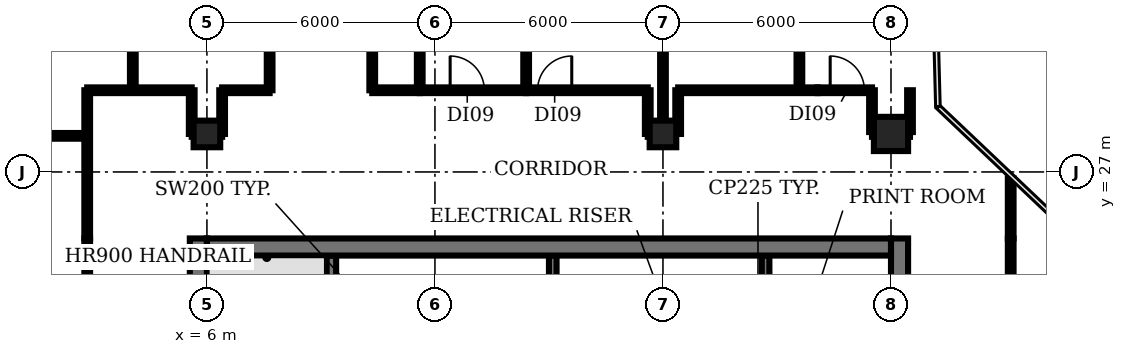
"""IFC4 building model, lengths in metres.
Left out: names, types, materials, properties, quantities, classifications, styles, units other than length and angle.
Written with IfcOpenShell. Run it as: python <this file> out.ifc"""

import sys

from ifc_helpers import new_model, si_unit, direction, frame, frame_2d, origin, origin_2d, place, context, subcontext, project, spatial, rectangle, circle, extrude, element, fill, save


model = new_model("IFC4")
c1 = context("Model", 3, precision=1e-05, world=origin(), true_north=direction((0.0, 1.0)))
c2 = subcontext(c1, "Body", "Model", "MODEL_VIEW")
j1 = project(units=[si_unit("LENGTHUNIT", "METRE"), si_unit("PLANEANGLEUNIT", "RADIAN")], contexts=[c1])
p1 = place(None, origin())
s1 = spatial("IfcSite", under=j1, at=p1, CompositionType="ELEMENT")
p2 = place(p1, origin())
s2 = spatial("IfcBuilding", under=s1, at=p2, CompositionType="ELEMENT")
p3 = place(p2, frame((0.0, 0.0, 222.2)))
s3 = spatial("IfcBuildingStorey", under=s2, at=p3, CompositionType="ELEMENT", Elevation=222.2)
for number, where, z_axis, x_axis in (
    (1, (6.0, 28.0, 0.0), (0.0, 0.0, 1.0), (1.0, 0.0, 0.0)),
    (2, (18.0, 28.0, 0.0), (0.0, 0.0, 1.0), (1.0, 0.0, 0.0)),
):
    element("IfcColumn", number, at=place(p3, frame(where, z_axis=z_axis, x_axis=x_axis)), inside=s3, PredefinedType="COLUMN", context=c2, shape_type="SweptSolid", body=[
        extrude(rectangle(XDim=0.7, YDim=0.7, at=origin_2d()), origin(), (0.0, 0.0, 1.0), 3.85),
    ])
p4 = place(p3, frame((24.0, 28.0, 0.0), z_axis=(0.0, 0.0, 1.0), x_axis=(1.0, 0.0, 0.0)))
e3 = element("IfcColumn", 3, at=p4, inside=s3, PredefinedType="COLUMN", context=c2, shape_type="SweptSolid", body=[
    extrude(circle(Radius=0.45, at=origin_2d()), origin(), (0.0, 0.0, 1.0), 3.85),
])
p5 = place(p3, frame((9.275, 18.375, 0.0), z_axis=(0.0, 0.0, 1.0), x_axis=(0.0, 1.0, 0.0)))
e4 = element("IfcWall", 4, at=p5, inside=s3, PredefinedType="SHEAR", context=c2, shape_type="SweptSolid", body=[
    extrude(rectangle(XDim=6.425, YDim=0.25, at=frame_2d((3.212, 0.0))), origin(), (0.0, 0.0, 1.0), 3.85),
])
for number, where, z_axis, x_axis in (
    (5, (15.1, 22.9, 0.0), (0.0, 0.0, 1.0), (0.0, 1.0, 0.0)),
    (6, (20.7, 22.9, 0.0), (0.0, 0.0, 1.0), (0.0, 1.0, 0.0)),
):
    element("IfcWall", number, at=place(p3, frame(where, z_axis=z_axis, x_axis=x_axis)), inside=s3, PredefinedType="SHEAR", context=c2, shape_type="SweptSolid", body=[
        extrude(rectangle(XDim=1.9, YDim=0.2, at=frame_2d((0.95, 0.0))), origin(), (0.0, 0.0, 1.0), 3.85),
    ])
p6 = place(p3, frame((5.775, 4.42, 0.0), z_axis=(0.0, 0.0, 1.0), x_axis=(0.0, 1.0, 0.0)))
e7 = element("IfcWall", 7, at=p6, inside=s3, PredefinedType="SHEAR", context=c2, shape_type="SweptSolid", body=[
    extrude(rectangle(XDim=20.83, YDim=0.45, at=frame_2d((10.415, 0.0))), origin(), (0.0, 0.0, 1.0), 3.85),
])
p7 = place(p6, frame((1.23, 0.0, 0.0)))
e8 = element("IfcOpeningElement", 8, at=p7, cuts=e7, PredefinedType="OPENING", context=c2, shape_type="SweptSolid", body=[
    extrude(rectangle(XDim=1.5, YDim=2.1, at=frame_2d((0.75, 1.05))), frame((0.0, 0.235, 0.0), z_axis=(0.0, -1.0, 0.0), x_axis=(1.0, 0.0, 0.0)), (0.0, 0.0, 1.0), 0.47),
])
p8 = place(p6, frame((7.68, 0.0, 0.0)))
e9 = element("IfcOpeningElement", 9, at=p8, cuts=e7, PredefinedType="OPENING", context=c2, shape_type="SweptSolid", body=[
    extrude(rectangle(XDim=1.2, YDim=2.1, at=frame_2d((0.6, 1.05))), frame((0.0, 0.235, 0.0), z_axis=(0.0, -1.0, 0.0), x_axis=(1.0, 0.0, 0.0)), (0.0, 0.0, 1.0), 0.47),
])
p9 = place(p6, frame((14.23, 0.0, 0.0)))
e10 = element("IfcOpeningElement", 10, at=p9, cuts=e7, PredefinedType="OPENING", context=c2, shape_type="SweptSolid", body=[
    extrude(rectangle(XDim=1.2, YDim=2.1, at=frame_2d((0.6, 1.05))), frame((0.0, 0.235, 0.0), z_axis=(0.0, -1.0, 0.0), x_axis=(1.0, 0.0, 0.0)), (0.0, 0.0, 1.0), 0.47),
])
p10 = place(p3, frame((24.225, 25.25, 0.0), z_axis=(0.0, 0.0, 1.0), x_axis=(0.0, -1.0, 0.0)))
e11 = element("IfcWall", 11, at=p10, inside=s3, PredefinedType="SHEAR", context=c2, shape_type="SweptSolid", body=[
    extrude(rectangle(XDim=20.83, YDim=0.45, at=frame_2d((10.415, 0.0))), origin(), (0.0, 0.0, 1.0), 3.85),
])
p11 = place(p10, frame((18.1, 0.0, 0.0)))
e12 = element("IfcOpeningElement", 12, at=p11, cuts=e11, PredefinedType="OPENING", context=c2, shape_type="SweptSolid", body=[
    extrude(rectangle(XDim=1.5, YDim=2.1, at=frame_2d((0.75, 1.05))), frame((0.0, 0.235, 0.0), z_axis=(0.0, -1.0, 0.0), x_axis=(1.0, 0.0, 0.0)), (0.0, 0.0, 1.0), 0.47),
])
p12 = place(p10, frame((12.0, 0.0, 0.0)))
e13 = element("IfcOpeningElement", 13, at=p12, cuts=e11, PredefinedType="OPENING", context=c2, shape_type="SweptSolid", body=[
    extrude(rectangle(XDim=0.9, YDim=2.1, at=frame_2d((0.45, 1.05))), frame((0.0, 0.235, 0.0), z_axis=(0.0, -1.0, 0.0), x_axis=(1.0, 0.0, 0.0)), (0.0, 0.0, 1.0), 0.47),
])
p13 = place(p10, frame((6.0, 0.0, 0.0)))
e14 = element("IfcOpeningElement", 14, at=p13, cuts=e11, PredefinedType="OPENING", context=c2, shape_type="SweptSolid", body=[
    extrude(rectangle(XDim=2.0, YDim=2.1, at=frame_2d((1.0, 1.05))), frame((0.0, 0.235, 0.0), z_axis=(0.0, -1.0, 0.0), x_axis=(1.0, 0.0, 0.0)), (0.0, 0.0, 1.0), 0.47),
])
p14 = place(p3, frame((6.0, 25.025, 0.0), z_axis=(0.0, 0.0, 1.0), x_axis=(1.0, 0.0, 0.0)))
e15 = element("IfcWall", 15, at=p14, inside=s3, PredefinedType="SHEAR", context=c2, shape_type="SweptSolid", body=[
    extrude(rectangle(XDim=18.0, YDim=0.45, at=frame_2d((9.0, 0.0))), origin(), (0.0, 0.0, 1.0), 3.85),
])
p15 = place(p3, frame((-0.98, 27.95, 0.0), z_axis=(0.0, 0.0, 1.0), x_axis=(1.0, 0.0, 0.0)))
e16 = element("IfcWall", 16, at=p15, inside=s3, PredefinedType="PARTITIONING", context=c2, shape_type="SweptSolid", body=[
    extrude(rectangle(XDim=3.83, YDim=0.15, at=frame_2d((1.915, 0.0))), origin(), (0.0, 0.0, 1.0), 2.88),
])
p16 = place(p3, frame((2.85, 5.77, 0.0), z_axis=(0.0, 0.0, 1.0), x_axis=(0.0, 1.0, 0.0)))
e17 = element("IfcWall", 17, at=p16, inside=s3, PredefinedType="PARTITIONING", context=c2, shape_type="SweptSolid", body=[
    extrude(rectangle(XDim=19.48, YDim=0.15, at=frame_2d((9.74, 0.0))), origin(), (0.0, 0.0, 1.0), 2.88),
])
p17 = place(p16, frame((8.48, 0.0, 0.0)))
e18 = element("IfcOpeningElement", 18, at=p17, cuts=e17, PredefinedType="OPENING", context=c2, shape_type="SweptSolid", body=[
    extrude(rectangle(XDim=1.2, YDim=2.1, at=frame_2d((0.6, 1.05))), frame((0.0, 0.085, 0.0), z_axis=(0.0, -1.0, 0.0), x_axis=(1.0, 0.0, 0.0)), (0.0, 0.0, 1.0), 0.17),
])
p18 = place(p3, frame((2.85, 25.25, 0.0), z_axis=(0.0, 0.0, 1.0), x_axis=(0.0, 1.0, 0.0)))
e19 = element("IfcWall", 19, at=p18, inside=s3, PredefinedType="PARTITIONING", context=c2, shape_type="SweptSolid", body=[
    extrude(rectangle(XDim=3.9, YDim=0.15, at=frame_2d((1.95, 0.0))), origin(), (0.0, 0.0, 1.0), 2.88),
])
p19 = place(p3, frame((2.85, 29.15, 0.0), z_axis=(0.0, 0.0, 1.0), x_axis=(1.0, 0.0, 0.0)))
e20 = element("IfcWall", 20, at=p19, inside=s3, PredefinedType="PARTITIONING", context=c2, shape_type="SweptSolid", body=[
    extrude(rectangle(XDim=2.75, YDim=0.15, at=frame_2d((1.375, 0.0))), origin(), (0.0, 0.0, 1.0), 2.88),
])
p20 = place(p3, frame((4.05, 29.15, 0.0), z_axis=(0.0, 0.0, 1.0), x_axis=(0.0, 1.0, 0.0)))
e21 = element("IfcWall", 21, at=p20, inside=s3, PredefinedType="PARTITIONING", context=c2, shape_type="SweptSolid", body=[
    extrude(rectangle(XDim=4.8, YDim=0.15, at=frame_2d((2.4, 0.0))), origin(), (0.0, 0.0, 1.0), 2.88),
])
p21 = place(p3, frame((5.6, 28.0, 0.0), z_axis=(0.0, 0.0, 1.0), x_axis=(0.0, 1.0, 0.0)))
e22 = element("IfcWall", 22, at=p21, inside=s3, PredefinedType="PARTITIONING", context=c2, shape_type="SweptSolid", body=[
    extrude(rectangle(XDim=1.15, YDim=0.15, at=frame_2d((0.575, 0.0))), origin(), (0.0, 0.0, 1.0), 2.88),
])
p22 = place(p3, frame((5.6, 28.0, 0.0), z_axis=(0.0, 0.0, 1.0), x_axis=(1.0, 0.0, 0.0)))
e23 = element("IfcWall", 23, at=p22, inside=s3, PredefinedType="PARTITIONING", context=c2, shape_type="SweptSolid", body=[
    extrude(rectangle(XDim=0.8, YDim=0.15, at=frame_2d((0.4, 0.0))), origin(), (0.0, 0.0, 1.0), 2.88),
])
p23 = place(p3, frame((6.4, 28.0, 0.0), z_axis=(0.0, 0.0, 1.0), x_axis=(0.0, 1.0, 0.0)))
e24 = element("IfcWall", 24, at=p23, inside=s3, PredefinedType="PARTITIONING", context=c2, shape_type="SweptSolid", body=[
    extrude(rectangle(XDim=1.15, YDim=0.15, at=frame_2d((0.575, 0.0))), origin(), (0.0, 0.0, 1.0), 2.88),
])
p24 = place(p3, frame((6.4, 29.15, 0.0), z_axis=(0.0, 0.0, 1.0), x_axis=(1.0, 0.0, 0.0)))
e25 = element("IfcWall", 25, at=p24, inside=s3, PredefinedType="PARTITIONING", context=c2, shape_type="SweptSolid", body=[
    extrude(rectangle(XDim=1.25, YDim=0.15, at=frame_2d((0.625, 0.0))), origin(), (0.0, 0.0, 1.0), 2.88),
])
p25 = place(p3, frame((7.65, 29.15, 0.0), z_axis=(0.0, 0.0, 1.0), x_axis=(0.0, 1.0, 0.0)))
e26 = element("IfcWall", 26, at=p25, inside=s3, PredefinedType="PARTITIONING", context=c2, shape_type="SweptSolid", body=[
    extrude(rectangle(XDim=4.8, YDim=0.15, at=frame_2d((2.4, 0.0))), origin(), (0.0, 0.0, 1.0), 2.88),
])
p26 = place(p25, frame((1.9, 0.0, 0.0)))
e27 = element("IfcOpeningElement", 27, at=p26, cuts=e26, PredefinedType="OPENING", context=c2, shape_type="SweptSolid", body=[
    extrude(rectangle(XDim=0.9, YDim=2.1, at=frame_2d((0.45, 1.05))), frame((0.0, 0.085, 0.0), z_axis=(0.0, -1.0, 0.0), x_axis=(1.0, 0.0, 0.0)), (0.0, 0.0, 1.0), 0.17),
])
p27 = place(p3, frame((10.35, 29.15, 0.0), z_axis=(0.0, 0.0, 1.0), x_axis=(0.0, 1.0, 0.0)))
e28 = element("IfcWall", 28, at=p27, inside=s3, PredefinedType="PARTITIONING", context=c2, shape_type="SweptSolid", body=[
    extrude(rectangle(XDim=4.8, YDim=0.15, at=frame_2d((2.4, 0.0))), origin(), (0.0, 0.0, 1.0), 2.88),
])
p28 = place(p3, frame((10.35, 29.15, 0.0), z_axis=(0.0, 0.0, 1.0), x_axis=(1.0, 0.0, 0.0)))
e29 = element("IfcWall", 29, at=p28, inside=s3, PredefinedType="PARTITIONING", context=c2, shape_type="SweptSolid", body=[
    extrude(rectangle(XDim=1.25, YDim=0.15, at=frame_2d((0.625, 0.0))), origin(), (0.0, 0.0, 1.0), 2.88),
])
p29 = place(p3, frame((11.6, 29.15, 0.0), z_axis=(0.0, 0.0, 1.0), x_axis=(0.0, 1.0, 0.0)))
e30 = element("IfcWall", 30, at=p29, inside=s3, PredefinedType="PARTITIONING", context=c2, shape_type="SweptSolid", body=[
    extrude(rectangle(XDim=4.72, YDim=0.15, at=frame_2d((2.36, 0.0))), origin(), (0.0, 0.0, 1.0), 2.88),
])
p30 = place(p3, frame((11.6, 29.15, 0.0), z_axis=(0.0, 0.0, 1.0), x_axis=(1.0, 0.0, 0.0)))
e31 = element("IfcWall", 31, at=p30, inside=s3, PredefinedType="PARTITIONING", context=c2, shape_type="SweptSolid", body=[
    extrude(rectangle(XDim=2.8, YDim=0.15, at=frame_2d((1.4, 0.0))), origin(), (0.0, 0.0, 1.0), 2.88),
])
p31 = place(p30, frame((0.8, 0.0, 0.0)))
e32 = element("IfcOpeningElement", 32, at=p31, cuts=e31, PredefinedType="OPENING", context=c2, shape_type="SweptSolid", body=[
    extrude(rectangle(XDim=0.9, YDim=2.1, at=frame_2d((0.45, 1.05))), frame((0.0, 0.085, 0.0), z_axis=(0.0, -1.0, 0.0), x_axis=(1.0, 0.0, 0.0)), (0.0, 0.0, 1.0), 0.17),
])
p32 = place(p3, frame((14.4, 29.15, 0.0), z_axis=(0.0, 0.0, 1.0), x_axis=(0.0, 1.0, 0.0)))
e33 = element("IfcWall", 33, at=p32, inside=s3, PredefinedType="PARTITIONING", context=c2, shape_type="SweptSolid", body=[
    extrude(rectangle(XDim=4.8, YDim=0.15, at=frame_2d((2.4, 0.0))), origin(), (0.0, 0.0, 1.0), 2.88),
])
p33 = place(p3, frame((14.4, 29.15, 0.0), z_axis=(0.0, 0.0, 1.0), x_axis=(1.0, 0.0, 0.0)))
e34 = element("IfcWall", 34, at=p33, inside=s3, PredefinedType="PARTITIONING", context=c2, shape_type="SweptSolid", body=[
    extrude(rectangle(XDim=3.2, YDim=0.15, at=frame_2d((1.6, 0.0))), origin(), (0.0, 0.0, 1.0), 2.88),
])
p34 = place(p33, frame((0.3, 0.0, 0.0)))
e35 = element("IfcOpeningElement", 35, at=p34, cuts=e34, PredefinedType="OPENING", context=c2, shape_type="SweptSolid", body=[
    extrude(rectangle(XDim=0.9, YDim=2.1, at=frame_2d((0.45, 1.05))), frame((0.0, 0.085, 0.0), z_axis=(0.0, -1.0, 0.0), x_axis=(1.0, 0.0, 0.0)), (0.0, 0.0, 1.0), 0.17),
])
p35 = place(p3, frame((17.6, 28.0, 0.0), z_axis=(0.0, 0.0, 1.0), x_axis=(0.0, 1.0, 0.0)))
e36 = element("IfcWall", 36, at=p35, inside=s3, PredefinedType="PARTITIONING", context=c2, shape_type="SweptSolid", body=[
    extrude(rectangle(XDim=1.15, YDim=0.15, at=frame_2d((0.575, 0.0))), origin(), (0.0, 0.0, 1.0), 2.88),
])
p36 = place(p3, frame((17.6, 28.0, 0.0), z_axis=(0.0, 0.0, 1.0), x_axis=(1.0, 0.0, 0.0)))
e37 = element("IfcWall", 37, at=p36, inside=s3, PredefinedType="PARTITIONING", context=c2, shape_type="SweptSolid", body=[
    extrude(rectangle(XDim=0.4, YDim=0.15, at=frame_2d((0.2, 0.0))), origin(), (0.0, 0.0, 1.0), 2.88),
])
p37 = place(p3, frame((18.0, 28.0, 0.0), z_axis=(0.0, 0.0, 1.0), x_axis=(0.0, 1.0, 0.0)))
e38 = element("IfcWall", 38, at=p37, inside=s3, PredefinedType="PARTITIONING", context=c2, shape_type="SweptSolid", body=[
    extrude(rectangle(XDim=5.95, YDim=0.15, at=frame_2d((2.975, 0.0))), origin(), (0.0, 0.0, 1.0), 2.88),
])
p38 = place(p3, frame((18.4, 28.0, 0.0), z_axis=(0.0, 0.0, 1.0), x_axis=(0.0, 1.0, 0.0)))
e39 = element("IfcWall", 39, at=p38, inside=s3, PredefinedType="PARTITIONING", context=c2, shape_type="SweptSolid", body=[
    extrude(rectangle(XDim=1.15, YDim=0.15, at=frame_2d((0.575, 0.0))), origin(), (0.0, 0.0, 1.0), 2.88),
])
p39 = place(p3, frame((18.4, 29.15, 0.0), z_axis=(0.0, 0.0, 1.0), x_axis=(1.0, 0.0, 0.0)))
e40 = element("IfcWall", 40, at=p39, inside=s3, PredefinedType="PARTITIONING", context=c2, shape_type="SweptSolid", body=[
    extrude(rectangle(XDim=3.67, YDim=0.15, at=frame_2d((1.835, 0.0))), origin(), (0.0, 0.0, 1.0), 2.88),
])
p40 = place(p3, frame((21.59, 29.15, 0.0), z_axis=(0.0, 0.0, 1.0), x_axis=(0.0, 1.0, 0.0)))
e41 = element("IfcWall", 41, at=p40, inside=s3, PredefinedType="PARTITIONING", context=c2, shape_type="SweptSolid", body=[
    extrude(rectangle(XDim=4.8, YDim=0.15, at=frame_2d((2.4, 0.0))), origin(), (0.0, 0.0, 1.0), 2.88),
])
p41 = place(p3, frame((22.07, 29.15, 0.0), z_axis=(0.0, 0.0, 1.0), x_axis=(1.0, 0.0, 0.0)))
e42 = element("IfcWall", 42, at=p41, inside=s3, PredefinedType="PARTITIONING", context=c2, shape_type="SweptSolid", body=[
    extrude(rectangle(XDim=1.43, YDim=0.15, at=frame_2d((0.715, 0.0))), origin(), (0.0, 0.0, 1.0), 2.88),
])
p42 = place(p41, frame((0.33, 0.0, 0.0)))
e43 = element("IfcOpeningElement", 43, at=p42, cuts=e42, PredefinedType="OPENING", context=c2, shape_type="SweptSolid", body=[
    extrude(rectangle(XDim=0.9, YDim=2.1, at=frame_2d((0.45, 1.05))), frame((0.0, 0.085, 0.0), z_axis=(0.0, -1.0, 0.0), x_axis=(1.0, 0.0, 0.0)), (0.0, 0.0, 1.0), 0.17),
])
p43 = place(p3, frame((23.5, 28.0, 0.0), z_axis=(0.0, 0.0, 1.0), x_axis=(1.0, 0.0, 0.0)))
e44 = element("IfcWall", 44, at=p43, inside=s3, PredefinedType="PARTITIONING", context=c2, shape_type="SweptSolid", body=[
    extrude(rectangle(XDim=1.0, YDim=0.15, at=frame_2d((0.5, 0.0))), origin(), (0.0, 0.0, 1.0), 2.88),
])
for number, where, z_axis, x_axis in (
    (45, (23.5, 28.05, 0.0), (0.0, 0.0, 1.0), (0.0, 1.0, 0.0)),
    (46, (24.5, 28.05, 0.0), (0.0, 0.0, 1.0), (0.0, 1.0, 0.0)),
):
    element("IfcWall", number, at=place(p3, frame(where, z_axis=z_axis, x_axis=x_axis)), inside=s3, PredefinedType="PARTITIONING", context=c2, shape_type="SweptSolid", body=[
        extrude(rectangle(XDim=1.1, YDim=0.15, at=frame_2d((0.55, 0.0))), origin(), (0.0, 0.0, 1.0), 2.88),
    ])
p44 = place(p3, frame((27.15, 25.25, 0.0), z_axis=(0.0, 0.0, 1.0), x_axis=(0.0, -1.0, 0.0)))
e47 = element("IfcWall", 47, at=p44, inside=s3, PredefinedType="PARTITIONING", context=c2, shape_type="SweptSolid", body=[
    extrude(rectangle(XDim=4.85, YDim=0.15, at=frame_2d((2.425, 0.0))), origin(), (0.0, 0.0, 1.0), 2.88),
])
p45 = place(p44, frame((1.55, 0.0, 0.0)))
e48 = element("IfcOpeningElement", 48, at=p45, cuts=e47, PredefinedType="OPENING", context=c2, shape_type="SweptSolid", body=[
    extrude(rectangle(XDim=1.0, YDim=2.1, at=frame_2d((0.5, 1.05))), frame((0.0, 0.085, 0.0), z_axis=(0.0, -1.0, 0.0), x_axis=(1.0, 0.0, 0.0)), (0.0, 0.0, 1.0), 0.17),
])
p46 = place(p3, frame((27.15, 25.25, 0.0), z_axis=(0.0, 0.0, 1.0), x_axis=(0.0, 1.0, 0.0)))
e49 = element("IfcWall", 49, at=p46, inside=s3, PredefinedType="PARTITIONING", context=c2, shape_type="SweptSolid", body=[
    extrude(rectangle(XDim=1.58, YDim=0.15, at=frame_2d((0.79, 0.0))), origin(), (0.0, 0.0, 1.0), 2.88),
])
p47 = place(p31, origin())
e50 = element("IfcDoor", 50, at=p47, inside=s3, OperationType="SINGLE_SWING_LEFT", PredefinedType="DOOR", context=c2, shape_type="SweptSolid", body=[
    extrude(rectangle(XDim=0.9, YDim=2.1, at=frame_2d((0.45, 1.05))), frame((0.0, 0.025, 0.0), z_axis=(0.0, -1.0, 0.0), x_axis=(1.0, 0.0, 0.0)), (0.0, 0.0, 1.0), 0.05),
])
fill(e32, e50)
p48 = place(p34, origin())
e51 = element("IfcDoor", 51, at=p48, inside=s3, OperationType="SINGLE_SWING_RIGHT", PredefinedType="DOOR", context=c2, shape_type="SweptSolid", body=[
    extrude(rectangle(XDim=0.9, YDim=2.1, at=frame_2d((0.45, 1.05))), frame((0.0, 0.025, 0.0), z_axis=(0.0, -1.0, 0.0), x_axis=(1.0, 0.0, 0.0)), (0.0, 0.0, 1.0), 0.05),
])
fill(e35, e51)
p49 = place(p42, origin())
e52 = element("IfcDoor", 52, at=p49, inside=s3, OperationType="SINGLE_SWING_LEFT", PredefinedType="DOOR", context=c2, shape_type="SweptSolid", body=[
    extrude(rectangle(XDim=0.9, YDim=2.1, at=frame_2d((0.45, 1.05))), frame((0.0, 0.025, 0.0), z_axis=(0.0, -1.0, 0.0), x_axis=(1.0, 0.0, 0.0)), (0.0, 0.0, 1.0), 0.05),
])
fill(e43, e52)
save(model, sys.argv[1])
